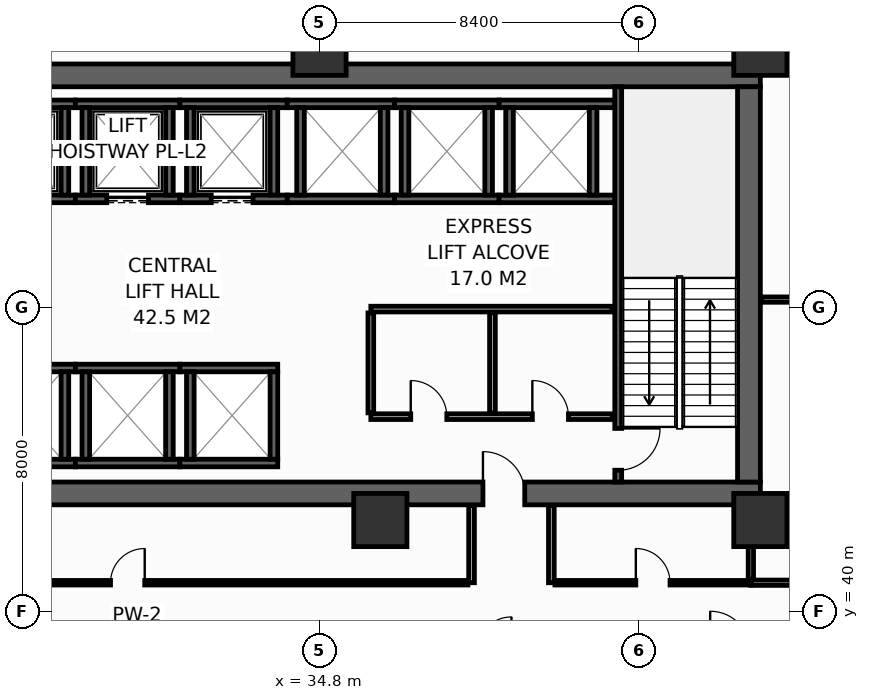
"""IFC4 building model, lengths in metres.
Left out: names, types, materials, properties, quantities, classifications, styles, units other than length and angle.
Written with IfcOpenShell. Run it as: python <this file> out.ifc"""

import sys

from ifc_helpers import new_model, si_unit, direction, frame, frame_2d, origin, origin_2d, place, context, subcontext, project, spatial, rectangle, hollow_rectangle, extrude, element, fill, save


model = new_model("IFC4")
c1 = context("Model", 3, precision=1e-05, world=origin(), true_north=direction((0.0, 1.0)))
c2 = subcontext(c1, "Body", "Model", "MODEL_VIEW")
j1 = project(units=[si_unit("LENGTHUNIT", "METRE"), si_unit("PLANEANGLEUNIT", "RADIAN")], contexts=[c1])
p1 = place(None, origin())
s1 = spatial("IfcSite", under=j1, at=p1, CompositionType="ELEMENT")
p2 = place(p1, origin())
s2 = spatial("IfcBuilding", under=s1, at=p2, CompositionType="ELEMENT")
p3 = place(p2, frame((0.0, 0.0, 27.6)))
s3 = spatial("IfcBuildingStorey", under=s2, at=p3, CompositionType="ELEMENT", Elevation=27.6)
p4 = place(p3, frame((13.5, 43.1, 0.0), z_axis=(0.0, 0.0, 1.0), x_axis=(1.0, 0.0, 0.0)))
e1 = element("IfcWall", 1, at=p4, inside=s3, PredefinedType="SHEAR", context=c2, shape_type="SweptSolid", body=[
    extrude(rectangle(XDim=32.9, YDim=0.6, at=frame_2d((16.45, 0.0))), origin(), (0.0, 0.0, 1.0), 5.15),
])
p5 = place(p4, frame((5.4, 0.0, 0.0)))
e2 = element("IfcOpeningElement", 2, at=p5, cuts=e1, PredefinedType="OPENING", context=c2, shape_type="SweptSolid", body=[
    extrude(rectangle(XDim=1.1, YDim=2.15, at=frame_2d((0.55, 1.075))), frame((0.0, 0.31, 0.0), z_axis=(0.0, -1.0, 0.0), x_axis=(1.0, 0.0, 0.0)), (0.0, 0.0, 1.0), 0.62),
])
p6 = place(p4, frame((25.6, 0.0, 0.0)))
e3 = element("IfcOpeningElement", 3, at=p6, cuts=e1, PredefinedType="OPENING", context=c2, shape_type="SweptSolid", body=[
    extrude(rectangle(XDim=1.1, YDim=2.15, at=frame_2d((0.55, 1.075))), frame((0.0, 0.31, 0.0), z_axis=(0.0, -1.0, 0.0), x_axis=(1.0, 0.0, 0.0)), (0.0, 0.0, 1.0), 0.62),
])
p7 = place(p3, frame((13.5, 54.1, 0.0), z_axis=(0.0, 0.0, 1.0), x_axis=(1.0, 0.0, 0.0)))
e4 = element("IfcWall", 4, at=p7, inside=s3, PredefinedType="SHEAR", context=c2, shape_type="SweptSolid", body=[
    extrude(rectangle(XDim=32.9, YDim=0.6, at=frame_2d((16.45, 0.0))), origin(), (0.0, 0.0, 1.0), 5.15),
])
p8 = place(p3, frame((46.1, 43.4, 0.0), z_axis=(0.0, 0.0, 1.0), x_axis=(0.0, 1.0, 0.0)))
e5 = element("IfcWall", 5, at=p8, inside=s3, PredefinedType="SHEAR", context=c2, shape_type="SweptSolid", body=[
    extrude(rectangle(XDim=10.4, YDim=0.6, at=frame_2d((5.2, 0.0))), origin(), (0.0, 0.0, 1.0), 5.15),
])
for number, where, z_axis, x_axis in (
    (6, (34.8, 54.8, 0.0), (0.0, 0.0, 1.0), (1.0, 0.0, 0.0)),
    (7, (46.4, 54.8, 0.0), (0.0, 0.0, 1.0), (1.0, 0.0, 0.0)),
    (8, (36.4, 42.4, 0.0), (0.0, 0.0, 1.0), (1.0, 0.0, 0.0)),
    (9, (46.4, 42.4, 0.0), (0.0, 0.0, 1.0), (1.0, 0.0, 0.0)),
):
    element("IfcColumn", number, at=place(p3, frame(where, z_axis=z_axis, x_axis=x_axis)), inside=s3, PredefinedType="COLUMN", context=c2, shape_type="SweptSolid", body=[
        extrude(hollow_rectangle(XDim=1.4, YDim=1.4, WallThickness=0.065, at=origin_2d()), origin(), (0.0, 0.0, 1.0), 5.4),
    ])
p9 = place(p3, frame((25.35, 50.85, 0.0), z_axis=(0.0, 0.0, 1.0), x_axis=(1.0, 0.0, 0.0)))
e10 = element("IfcWall", 10, at=p9, inside=s3, PredefinedType="SHEAR", context=c2, shape_type="SweptSolid", body=[
    extrude(rectangle(XDim=3.025, YDim=0.2, at=frame_2d((1.512, 0.0))), origin(), (0.0, 0.0, 1.0), 5.15),
])
p10 = place(p9, frame((1.1, 0.0, 0.0)))
e11 = element("IfcOpeningElement", 11, at=p10, cuts=e10, PredefinedType="OPENING", context=c2, shape_type="SweptSolid", body=[
    extrude(rectangle(XDim=1.1, YDim=2.2, at=frame_2d((0.55, 1.1))), frame((0.0, 0.11, 0.0), z_axis=(0.0, -1.0, 0.0), x_axis=(1.0, 0.0, 0.0)), (0.0, 0.0, 1.0), 0.22),
])
p11 = place(p3, frame((25.575, 53.35, 0.0), z_axis=(0.0, 0.0, 1.0), x_axis=(1.0, 0.0, 0.0)))
e12 = element("IfcWall", 12, at=p11, inside=s3, PredefinedType="SHEAR", context=c2, shape_type="SweptSolid", body=[
    extrude(rectangle(XDim=2.8, YDim=0.2, at=frame_2d((1.4, 0.0))), origin(), (0.0, 0.0, 1.0), 5.15),
])
p12 = place(p3, frame((28.1, 50.95, 0.0), z_axis=(0.0, 0.0, 1.0), x_axis=(0.0, 1.0, 0.0)))
e13 = element("IfcWall", 13, at=p12, inside=s3, PredefinedType="SHEAR", context=c2, shape_type="SweptSolid", body=[
    extrude(rectangle(XDim=2.3, YDim=0.2, at=frame_2d((1.15, 0.0))), origin(), (0.0, 0.0, 1.0), 5.15),
])
p13 = place(p3, frame((28.375, 50.85, 0.0), z_axis=(0.0, 0.0, 1.0), x_axis=(1.0, 0.0, 0.0)))
e14 = element("IfcWall", 14, at=p13, inside=s3, PredefinedType="SHEAR", context=c2, shape_type="SweptSolid", body=[
    extrude(rectangle(XDim=2.75, YDim=0.2, at=frame_2d((1.375, 0.0))), origin(), (0.0, 0.0, 1.0), 5.15),
])
p14 = place(p13, frame((0.825, 0.0, 0.0)))
e15 = element("IfcOpeningElement", 15, at=p14, cuts=e14, PredefinedType="OPENING", context=c2, shape_type="SweptSolid", body=[
    extrude(rectangle(XDim=1.1, YDim=2.2, at=frame_2d((0.55, 1.1))), frame((0.0, 0.11, 0.0), z_axis=(0.0, -1.0, 0.0), x_axis=(1.0, 0.0, 0.0)), (0.0, 0.0, 1.0), 0.22),
])
p15 = place(p3, frame((28.375, 53.35, 0.0), z_axis=(0.0, 0.0, 1.0), x_axis=(1.0, 0.0, 0.0)))
e16 = element("IfcWall", 16, at=p15, inside=s3, PredefinedType="SHEAR", context=c2, shape_type="SweptSolid", body=[
    extrude(rectangle(XDim=2.75, YDim=0.2, at=frame_2d((1.375, 0.0))), origin(), (0.0, 0.0, 1.0), 5.15),
])
for number, where, z_axis, x_axis in (
    (17, (28.65, 50.95, 0.0), (0.0, 0.0, 1.0), (0.0, 1.0, 0.0)),
    (18, (30.85, 50.95, 0.0), (0.0, 0.0, 1.0), (0.0, 1.0, 0.0)),
):
    element("IfcWall", number, at=place(p3, frame(where, z_axis=z_axis, x_axis=x_axis)), inside=s3, PredefinedType="SHEAR", context=c2, shape_type="SweptSolid", body=[
        extrude(rectangle(XDim=2.3, YDim=0.2, at=frame_2d((1.15, 0.0))), origin(), (0.0, 0.0, 1.0), 5.15),
    ])
p16 = place(p3, frame((31.125, 50.85, 0.0), z_axis=(0.0, 0.0, 1.0), x_axis=(1.0, 0.0, 0.0)))
e19 = element("IfcWall", 19, at=p16, inside=s3, PredefinedType="SHEAR", context=c2, shape_type="SweptSolid", body=[
    extrude(rectangle(XDim=2.825, YDim=0.2, at=frame_2d((1.413, 0.0))), origin(), (0.0, 0.0, 1.0), 5.15),
])
p17 = place(p16, frame((0.825, 0.0, 0.0)))
e20 = element("IfcOpeningElement", 20, at=p17, cuts=e19, PredefinedType="OPENING", context=c2, shape_type="SweptSolid", body=[
    extrude(rectangle(XDim=1.1, YDim=2.2, at=frame_2d((0.55, 1.1))), frame((0.0, 0.11, 0.0), z_axis=(0.0, -1.0, 0.0), x_axis=(1.0, 0.0, 0.0)), (0.0, 0.0, 1.0), 0.22),
])
p18 = place(p3, frame((31.125, 53.35, 0.0), z_axis=(0.0, 0.0, 1.0), x_axis=(1.0, 0.0, 0.0)))
e21 = element("IfcWall", 21, at=p18, inside=s3, PredefinedType="SHEAR", context=c2, shape_type="SweptSolid", body=[
    extrude(rectangle(XDim=2.825, YDim=0.2, at=frame_2d((1.413, 0.0))), origin(), (0.0, 0.0, 1.0), 5.15),
])
for number, where, z_axis, x_axis in (
    (22, (31.4, 50.95, 0.0), (0.0, 0.0, 1.0), (0.0, 1.0, 0.0)),
    (23, (33.6, 50.95, 0.0), (0.0, 0.0, 1.0), (0.0, 1.0, 0.0)),
):
    element("IfcWall", number, at=place(p3, frame(where, z_axis=z_axis, x_axis=x_axis)), inside=s3, PredefinedType="SHEAR", context=c2, shape_type="SweptSolid", body=[
        extrude(rectangle(XDim=2.3, YDim=0.2, at=frame_2d((1.15, 0.0))), origin(), (0.0, 0.0, 1.0), 5.15),
    ])
for number, where, z_axis, x_axis in (
    (24, (25.8, 43.9, 0.0), (0.0, 0.0, 1.0), (1.0, 0.0, 0.0)),
    (25, (25.8, 46.4, 0.0), (0.0, 0.0, 1.0), (1.0, 0.0, 0.0)),
):
    element("IfcWall", number, at=place(p3, frame(where, z_axis=z_axis, x_axis=x_axis)), inside=s3, PredefinedType="SHEAR", context=c2, shape_type="SweptSolid", body=[
        extrude(rectangle(XDim=2.575, YDim=0.2, at=frame_2d((1.288, 0.0))), origin(), (0.0, 0.0, 1.0), 5.15),
    ])
p19 = place(p3, frame((28.1, 44.0, 0.0), z_axis=(0.0, 0.0, 1.0), x_axis=(0.0, 1.0, 0.0)))
e26 = element("IfcWall", 26, at=p19, inside=s3, PredefinedType="SHEAR", context=c2, shape_type="SweptSolid", body=[
    extrude(rectangle(XDim=2.3, YDim=0.2, at=frame_2d((1.15, 0.0))), origin(), (0.0, 0.0, 1.0), 5.15),
])
for number, where, z_axis, x_axis in (
    (27, (28.375, 43.9, 0.0), (0.0, 0.0, 1.0), (1.0, 0.0, 0.0)),
    (28, (28.375, 46.4, 0.0), (0.0, 0.0, 1.0), (1.0, 0.0, 0.0)),
):
    element("IfcWall", number, at=place(p3, frame(where, z_axis=z_axis, x_axis=x_axis)), inside=s3, PredefinedType="SHEAR", context=c2, shape_type="SweptSolid", body=[
        extrude(rectangle(XDim=2.75, YDim=0.2, at=frame_2d((1.375, 0.0))), origin(), (0.0, 0.0, 1.0), 5.15),
    ])
for number, where, z_axis, x_axis in (
    (29, (28.65, 44.0, 0.0), (0.0, 0.0, 1.0), (0.0, 1.0, 0.0)),
    (30, (30.85, 44.0, 0.0), (0.0, 0.0, 1.0), (0.0, 1.0, 0.0)),
):
    element("IfcWall", number, at=place(p3, frame(where, z_axis=z_axis, x_axis=x_axis)), inside=s3, PredefinedType="SHEAR", context=c2, shape_type="SweptSolid", body=[
        extrude(rectangle(XDim=2.3, YDim=0.2, at=frame_2d((1.15, 0.0))), origin(), (0.0, 0.0, 1.0), 5.15),
    ])
for number, where, z_axis, x_axis in (
    (31, (31.125, 43.9, 0.0), (0.0, 0.0, 1.0), (1.0, 0.0, 0.0)),
    (32, (31.125, 46.4, 0.0), (0.0, 0.0, 1.0), (1.0, 0.0, 0.0)),
):
    element("IfcWall", number, at=place(p3, frame(where, z_axis=z_axis, x_axis=x_axis)), inside=s3, PredefinedType="SHEAR", context=c2, shape_type="SweptSolid", body=[
        extrude(rectangle(XDim=2.575, YDim=0.2, at=frame_2d((1.288, 0.0))), origin(), (0.0, 0.0, 1.0), 5.15),
    ])
for number, where, z_axis, x_axis in (
    (33, (31.4, 44.0, 0.0), (0.0, 0.0, 1.0), (0.0, 1.0, 0.0)),
    (34, (33.6, 44.0, 0.0), (0.0, 0.0, 1.0), (0.0, 1.0, 0.0)),
):
    element("IfcWall", number, at=place(p3, frame(where, z_axis=z_axis, x_axis=x_axis)), inside=s3, PredefinedType="SHEAR", context=c2, shape_type="SweptSolid", body=[
        extrude(rectangle(XDim=2.3, YDim=0.2, at=frame_2d((1.15, 0.0))), origin(), (0.0, 0.0, 1.0), 5.15),
    ])
for number, where, z_axis, x_axis in (
    (35, (33.95, 50.85, 0.0), (0.0, 0.0, 1.0), (1.0, 0.0, 0.0)),
    (36, (33.95, 53.35, 0.0), (0.0, 0.0, 1.0), (1.0, 0.0, 0.0)),
):
    element("IfcWall", number, at=place(p3, frame(where, z_axis=z_axis, x_axis=x_axis)), inside=s3, PredefinedType="SHEAR", context=c2, shape_type="SweptSolid", body=[
        extrude(rectangle(XDim=2.825, YDim=0.2, at=frame_2d((1.413, 0.0))), origin(), (0.0, 0.0, 1.0), 5.15),
    ])
for number, where, z_axis, x_axis in (
    (37, (34.3, 50.95, 0.0), (0.0, 0.0, 1.0), (0.0, 1.0, 0.0)),
    (38, (36.5, 50.95, 0.0), (0.0, 0.0, 1.0), (0.0, 1.0, 0.0)),
):
    element("IfcWall", number, at=place(p3, frame(where, z_axis=z_axis, x_axis=x_axis)), inside=s3, PredefinedType="SHEAR", context=c2, shape_type="SweptSolid", body=[
        extrude(rectangle(XDim=2.3, YDim=0.2, at=frame_2d((1.15, 0.0))), origin(), (0.0, 0.0, 1.0), 5.15),
    ])
for number, where, z_axis, x_axis in (
    (39, (36.775, 50.85, 0.0), (0.0, 0.0, 1.0), (1.0, 0.0, 0.0)),
    (40, (36.775, 53.35, 0.0), (0.0, 0.0, 1.0), (1.0, 0.0, 0.0)),
):
    element("IfcWall", number, at=place(p3, frame(where, z_axis=z_axis, x_axis=x_axis)), inside=s3, PredefinedType="SHEAR", context=c2, shape_type="SweptSolid", body=[
        extrude(rectangle(XDim=2.75, YDim=0.2, at=frame_2d((1.375, 0.0))), origin(), (0.0, 0.0, 1.0), 5.15),
    ])
for number, where, z_axis, x_axis in (
    (41, (37.05, 50.95, 0.0), (0.0, 0.0, 1.0), (0.0, 1.0, 0.0)),
    (42, (39.25, 50.95, 0.0), (0.0, 0.0, 1.0), (0.0, 1.0, 0.0)),
):
    element("IfcWall", number, at=place(p3, frame(where, z_axis=z_axis, x_axis=x_axis)), inside=s3, PredefinedType="SHEAR", context=c2, shape_type="SweptSolid", body=[
        extrude(rectangle(XDim=2.3, YDim=0.2, at=frame_2d((1.15, 0.0))), origin(), (0.0, 0.0, 1.0), 5.15),
    ])
for number, where, z_axis, x_axis in (
    (43, (39.525, 50.85, 0.0), (0.0, 0.0, 1.0), (1.0, 0.0, 0.0)),
    (44, (39.525, 53.35, 0.0), (0.0, 0.0, 1.0), (1.0, 0.0, 0.0)),
):
    element("IfcWall", number, at=place(p3, frame(where, z_axis=z_axis, x_axis=x_axis)), inside=s3, PredefinedType="SHEAR", context=c2, shape_type="SweptSolid", body=[
        extrude(rectangle(XDim=3.045, YDim=0.2, at=frame_2d((1.522, 0.0))), origin(), (0.0, 0.0, 1.0), 5.15),
    ])
for number, where, z_axis, x_axis in (
    (45, (39.8, 50.95, 0.0), (0.0, 0.0, 1.0), (0.0, 1.0, 0.0)),
    (46, (42.0, 50.95, 0.0), (0.0, 0.0, 1.0), (0.0, 1.0, 0.0)),
):
    element("IfcWall", number, at=place(p3, frame(where, z_axis=z_axis, x_axis=x_axis)), inside=s3, PredefinedType="SHEAR", context=c2, shape_type="SweptSolid", body=[
        extrude(rectangle(XDim=2.3, YDim=0.2, at=frame_2d((1.15, 0.0))), origin(), (0.0, 0.0, 1.0), 5.15),
    ])
p20 = place(p3, frame((42.66, 53.8, 0.0), z_axis=(0.0, 0.0, 1.0), x_axis=(0.0, -1.0, 0.0)))
e47 = element("IfcWall", 47, at=p20, inside=s3, PredefinedType="SHEAR", context=c2, shape_type="SweptSolid", body=[
    extrude(rectangle(XDim=10.4, YDim=0.18, at=frame_2d((5.2, 0.0))), origin(), (0.0, 0.0, 1.0), 5.15),
])
p21 = place(p20, frame((8.99, 0.0, 0.0)))
e48 = element("IfcOpeningElement", 48, at=p21, cuts=e47, PredefinedType="OPENING", context=c2, shape_type="SweptSolid", body=[
    extrude(rectangle(XDim=1.1, YDim=2.15, at=frame_2d((0.55, 1.075))), frame((0.0, 0.1, 0.0), z_axis=(0.0, -1.0, 0.0), x_axis=(1.0, 0.0, 0.0)), (0.0, 0.0, 1.0), 0.2),
])
p22 = place(p3, frame((36.15, 45.12, 0.0), z_axis=(0.0, 0.0, 1.0), x_axis=(1.0, 0.0, 0.0)))
e49 = element("IfcWall", 49, at=p22, inside=s3, PredefinedType="PARTITIONING", context=c2, shape_type="SweptSolid", body=[
    extrude(rectangle(XDim=6.35, YDim=0.15, at=frame_2d((3.175, 0.0))), origin(), (0.0, 0.0, 1.0), 5.15),
])
p23 = place(p22, frame((1.05, 0.0, 0.0)))
e50 = element("IfcOpeningElement", 50, at=p23, cuts=e49, PredefinedType="OPENING", context=c2, shape_type="SweptSolid", body=[
    extrude(rectangle(XDim=0.95, YDim=2.15, at=frame_2d((0.475, 1.075))), frame((0.0, 0.085, 0.0), z_axis=(0.0, -1.0, 0.0), x_axis=(1.0, 0.0, 0.0)), (0.0, 0.0, 1.0), 0.17),
])
p24 = place(p22, frame((4.25, 0.0, 0.0)))
e51 = element("IfcOpeningElement", 51, at=p24, cuts=e49, PredefinedType="OPENING", context=c2, shape_type="SweptSolid", body=[
    extrude(rectangle(XDim=0.95, YDim=2.15, at=frame_2d((0.475, 1.075))), frame((0.0, 0.085, 0.0), z_axis=(0.0, -1.0, 0.0), x_axis=(1.0, 0.0, 0.0)), (0.0, 0.0, 1.0), 0.17),
])
p25 = place(p3, frame((36.15, 47.95, 0.0), z_axis=(0.0, 0.0, 1.0), x_axis=(1.0, 0.0, 0.0)))
e52 = element("IfcWall", 52, at=p25, inside=s3, PredefinedType="PARTITIONING", context=c2, shape_type="SweptSolid", body=[
    extrude(rectangle(XDim=6.35, YDim=0.15, at=frame_2d((3.175, 0.0))), origin(), (0.0, 0.0, 1.0), 5.15),
])
for number, where, z_axis, x_axis in (
    (53, (36.15, 45.22, 0.0), (0.0, 0.0, 1.0), (0.0, 1.0, 0.0)),
    (54, (39.35, 45.22, 0.0), (0.0, 0.0, 1.0), (0.0, 1.0, 0.0)),
):
    element("IfcWall", number, at=place(p3, frame(where, z_axis=z_axis, x_axis=x_axis)), inside=s3, PredefinedType="PARTITIONING", context=c2, shape_type="SweptSolid", body=[
        extrude(rectangle(XDim=2.63, YDim=0.15, at=frame_2d((1.315, 0.0))), origin(), (0.0, 0.0, 1.0), 5.15),
    ])
p26 = place(p3, frame((46.15, 40.75, 0.0), z_axis=(0.0, 0.0, 1.0), x_axis=(1.0, 0.0, 0.0)))
e55 = element("IfcWall", 55, at=p26, inside=s3, PredefinedType="PARTITIONING", context=c2, shape_type="SweptSolid", body=[
    extrude(rectangle(XDim=4.05, YDim=0.14, at=frame_2d((2.025, 0.0))), origin(), (0.0, 0.0, 1.0), 5.15),
])
p27 = place(p3, frame((46.15, 40.84, 0.0), z_axis=(0.0, 0.0, 1.0), x_axis=(0.0, 1.0, 0.0)))
e56 = element("IfcWall", 56, at=p27, inside=s3, PredefinedType="PARTITIONING", context=c2, shape_type="SweptSolid", body=[
    extrude(rectangle(XDim=1.94, YDim=0.14, at=frame_2d((0.97, 0.0))), origin(), (0.0, 0.0, 1.0), 5.15),
])
p28 = place(p3, frame((46.42, 48.2, 0.0), z_axis=(0.0, 0.0, 1.0), x_axis=(1.0, 0.0, 0.0)))
e57 = element("IfcWall", 57, at=p28, inside=s3, PredefinedType="PARTITIONING", context=c2, shape_type="SweptSolid", body=[
    extrude(rectangle(XDim=3.78, YDim=0.14, at=frame_2d((1.89, 0.0))), origin(), (0.0, 0.0, 1.0), 5.15),
])
for number, where, z_axis, x_axis in (
    (58, (38.8, 40.75, 0.0), (0.0, 0.0, 1.0), (0.0, 1.0, 0.0)),
    (59, (40.9, 40.75, 0.0), (0.0, 0.0, 1.0), (0.0, 1.0, 0.0)),
):
    element("IfcWall", number, at=place(p3, frame(where, z_axis=z_axis, x_axis=x_axis)), inside=s3, PredefinedType="PARTITIONING", context=c2, shape_type="SweptSolid", body=[
        extrude(rectangle(XDim=2.03, YDim=0.15, at=frame_2d((1.015, 0.0))), origin(), (0.0, 0.0, 1.0), 5.15),
    ])
p29 = place(p3, frame((20.795, 40.75, 0.0), z_axis=(0.0, 0.0, 1.0), x_axis=(1.0, 0.0, 0.0)))
e60 = element("IfcWall", 60, at=p29, inside=s3, PredefinedType="PARTITIONING", context=c2, shape_type="SweptSolid", body=[
    extrude(rectangle(XDim=17.91, YDim=0.12, at=frame_2d((8.955, 0.0))), origin(), (0.0, 0.0, 1.0), 4.235),
])
p30 = place(p29, frame((8.505, 0.0, 0.0)))
e61 = element("IfcOpeningElement", 61, at=p30, cuts=e60, PredefinedType="OPENING", context=c2, shape_type="SweptSolid", body=[
    extrude(rectangle(XDim=0.9, YDim=2.1, at=frame_2d((0.45, 1.05))), frame((0.0, 0.07, 0.0), z_axis=(0.0, -1.0, 0.0), x_axis=(1.0, 0.0, 0.0)), (0.0, 0.0, 1.0), 0.14),
])
p31 = place(p3, frame((40.995, 40.75, 0.0), z_axis=(0.0, 0.0, 1.0), x_axis=(1.0, 0.0, 0.0)))
e62 = element("IfcWall", 62, at=p31, inside=s3, PredefinedType="PARTITIONING", context=c2, shape_type="SweptSolid", body=[
    extrude(rectangle(XDim=5.155, YDim=0.12, at=frame_2d((2.577, 0.0))), origin(), (0.0, 0.0, 1.0), 5.15),
])
p32 = place(p31, frame((2.128, 0.0, 0.0)))
e63 = element("IfcOpeningElement", 63, at=p32, cuts=e62, PredefinedType="OPENING", context=c2, shape_type="SweptSolid", body=[
    extrude(rectangle(XDim=0.9, YDim=2.1, at=frame_2d((0.45, 1.05))), frame((0.0, 0.07, 0.0), z_axis=(0.0, -1.0, 0.0), x_axis=(1.0, 0.0, 0.0)), (0.0, 0.0, 1.0), 0.14),
])
p33 = place(p14, origin())
e64 = element("IfcDoor", 64, at=p33, inside=s3, OperationType="SLIDING_TO_LEFT", PredefinedType="DOOR", context=c2, shape_type="SweptSolid", body=[
    extrude(rectangle(XDim=1.1, YDim=2.2, at=frame_2d((0.55, 1.1))), frame((0.0, 0.025, 0.0), z_axis=(0.0, -1.0, 0.0), x_axis=(1.0, 0.0, 0.0)), (0.0, 0.0, 1.0), 0.05),
])
fill(e15, e64)
p34 = place(p17, origin())
e65 = element("IfcDoor", 65, at=p34, inside=s3, OperationType="SLIDING_TO_LEFT", PredefinedType="DOOR", context=c2, shape_type="SweptSolid", body=[
    extrude(rectangle(XDim=1.1, YDim=2.2, at=frame_2d((0.55, 1.1))), frame((0.0, 0.025, 0.0), z_axis=(0.0, -1.0, 0.0), x_axis=(1.0, 0.0, 0.0)), (0.0, 0.0, 1.0), 0.05),
])
fill(e20, e65)
p35 = place(p21, origin())
e66 = element("IfcDoor", 66, at=p35, inside=s3, OperationType="SINGLE_SWING_LEFT", PredefinedType="DOOR", context=c2, shape_type="SweptSolid", body=[
    extrude(rectangle(XDim=1.1, YDim=2.15, at=frame_2d((0.55, 1.075))), frame((0.0, 0.025, 0.0), z_axis=(0.0, -1.0, 0.0), x_axis=(1.0, 0.0, 0.0)), (0.0, 0.0, 1.0), 0.05),
])
fill(e48, e66)
p36 = place(p6, origin())
e67 = element("IfcDoor", 67, at=p36, inside=s3, OperationType="SINGLE_SWING_LEFT", PredefinedType="DOOR", context=c2, shape_type="SweptSolid", body=[
    extrude(rectangle(XDim=1.1, YDim=2.15, at=frame_2d((0.55, 1.075))), frame((0.0, 0.025, 0.0), z_axis=(0.0, -1.0, 0.0), x_axis=(1.0, 0.0, 0.0)), (0.0, 0.0, 1.0), 0.05),
])
fill(e3, e67)
p37 = place(p23, origin())
e68 = element("IfcDoor", 68, at=p37, inside=s3, OperationType="SINGLE_SWING_LEFT", PredefinedType="DOOR", context=c2, shape_type="SweptSolid", body=[
    extrude(rectangle(XDim=0.95, YDim=2.15, at=frame_2d((0.475, 1.075))), frame((0.0, 0.025, 0.0), z_axis=(0.0, -1.0, 0.0), x_axis=(1.0, 0.0, 0.0)), (0.0, 0.0, 1.0), 0.05),
])
fill(e50, e68)
p38 = place(p24, origin())
e69 = element("IfcDoor", 69, at=p38, inside=s3, OperationType="SINGLE_SWING_LEFT", PredefinedType="DOOR", context=c2, shape_type="SweptSolid", body=[
    extrude(rectangle(XDim=0.95, YDim=2.15, at=frame_2d((0.475, 1.075))), frame((0.0, 0.025, 0.0), z_axis=(0.0, -1.0, 0.0), x_axis=(1.0, 0.0, 0.0)), (0.0, 0.0, 1.0), 0.05),
])
fill(e51, e69)
p39 = place(p30, origin())
e70 = element("IfcDoor", 70, at=p39, inside=s3, OperationType="SINGLE_SWING_RIGHT", PredefinedType="DOOR", context=c2, shape_type="SweptSolid", body=[
    extrude(rectangle(XDim=0.9, YDim=2.1, at=frame_2d((0.45, 1.05))), frame((0.0, 0.025, 0.0), z_axis=(0.0, -1.0, 0.0), x_axis=(1.0, 0.0, 0.0)), (0.0, 0.0, 1.0), 0.05),
])
fill(e61, e70)
p40 = place(p32, origin())
e71 = element("IfcDoor", 71, at=p40, inside=s3, OperationType="SINGLE_SWING_LEFT", PredefinedType="DOOR", context=c2, shape_type="SweptSolid", body=[
    extrude(rectangle(XDim=0.9, YDim=2.1, at=frame_2d((0.45, 1.05))), frame((0.0, 0.025, 0.0), z_axis=(0.0, -1.0, 0.0), x_axis=(1.0, 0.0, 0.0)), (0.0, 0.0, 1.0), 0.05),
])
fill(e63, e71)
save(model, sys.argv[1])
